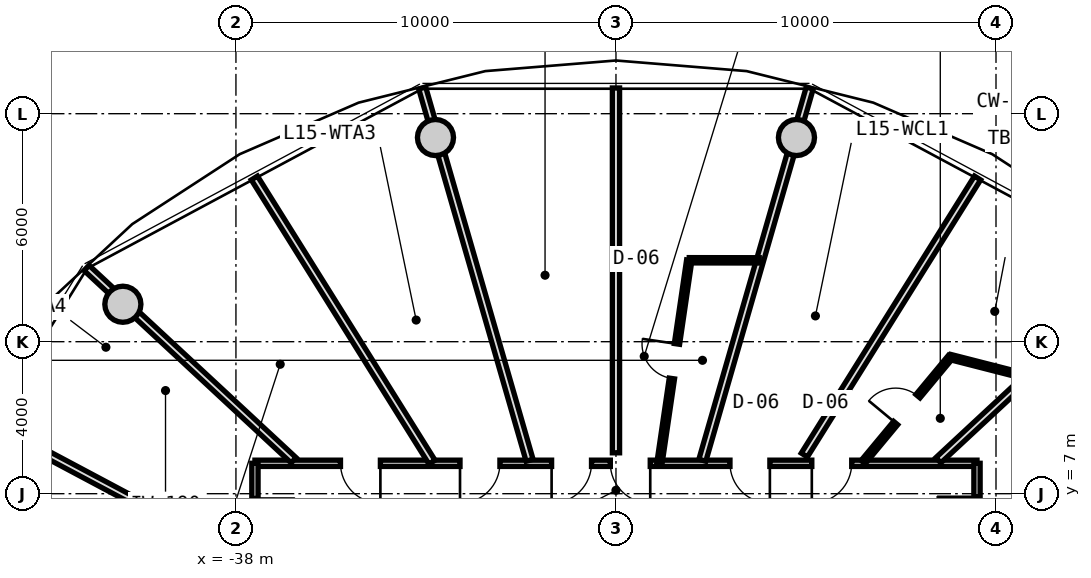
"""IFC4 building model, lengths in metres.
Left out: names, types, materials, properties, quantities, classifications, styles, units other than length and angle.
Written with IfcOpenShell. Run it as: python <this file> out.ifc"""

import sys

from ifc_helpers import new_model, si_unit, direction, frame, frame_2d, origin, origin_2d, place, context, subcontext, project, spatial, rectangle, circle, extrude, source, transform, mapped, element, fill, save


model = new_model("IFC4")
c1 = context("Model", 3, precision=1e-05, world=origin(), true_north=direction((0.0, 1.0)))
c2 = subcontext(c1, "Body", "Model", "MODEL_VIEW")
j1 = project(units=[si_unit("LENGTHUNIT", "METRE"), si_unit("PLANEANGLEUNIT", "RADIAN")], contexts=[c1])
p1 = place(None, origin())
s1 = spatial("IfcSite", under=j1, at=p1, CompositionType="ELEMENT")
p2 = place(p1, origin())
s2 = spatial("IfcBuilding", under=s1, at=p2, CompositionType="ELEMENT")
p3 = place(p2, frame((0.0, 0.0, 52.1)))
s3 = spatial("IfcBuildingStorey", under=s2, at=p3, CompositionType="ELEMENT", Elevation=52.1)
m1 = source(origin(), c2, "Body", "SweptSolid", [
    extrude(circle(Radius=0.475, at=origin_2d()), origin(), (0.0, 0.0, 1.0), 3.05),
])
for number, where, z_axis, x_axis in (
    (1, (-23.251, 16.373, 0.0), (0.0, 0.0, 1.0), (1.0, 0.0, 0.0)),
    (2, (-32.749, 16.373, 0.0), (0.0, 0.0, 1.0), (1.0, 0.0, 0.0)),
    (3, (-40.975, 11.985, 0.0), (0.0, 0.0, 1.0), (1.0, 0.0, 0.0)),
):
    element("IfcColumn", number, at=place(p3, frame(where, z_axis=z_axis, x_axis=x_axis)), inside=s3, PredefinedType="COLUMN", context=c2, shape_type="MappedRepresentation", body=[
        mapped(m1, transform((0.0, 0.0, 0.0), x_axis=(1.0, 0.0, 0.0), y_axis=(0.0, 1.0, 0.0), z_axis=(0.0, 0.0, 1.0), scale=1.0)),
    ])
m2 = source(origin(), c2, "Body", "SweptSolid", [
    extrude(rectangle(XDim=19.0, YDim=0.165, at=frame_2d((9.5, 0.0))), origin(), (0.0, 0.0, 1.0), 2.775),
])
p4 = place(p3, frame((-37.5, 7.8, 0.0), z_axis=(0.0, 0.0, 1.0), x_axis=(1.0, 0.0, 0.0)))
e4 = element("IfcWall", 4, at=p4, inside=s3, PredefinedType="PARTITIONING", context=c2, shape_type="MappedRepresentation", body=[
    mapped(m2, transform((0.0, 0.0, 0.0), x_axis=(1.0, 0.0, 0.0), y_axis=(0.0, 1.0, 0.0), z_axis=(0.0, 0.0, 1.0), scale=1.0)),
])
p5 = place(p4, frame((14.653, 0.0, 0.0)))
e5 = element("IfcOpeningElement", 5, at=p5, cuts=e4, PredefinedType="OPENING", context=c2, shape_type="SweptSolid", body=[
    extrude(rectangle(XDim=1.05, YDim=2.15, at=frame_2d((0.525, 1.075))), frame((0.0, 0.093, 0.0), z_axis=(0.0, -1.0, 0.0), x_axis=(1.0, 0.0, 0.0)), (0.0, 0.0, 1.0), 0.185),
])
p6 = place(p4, frame((12.5, 0.0, 0.0)))
e6 = element("IfcOpeningElement", 6, at=p6, cuts=e4, PredefinedType="OPENING", context=c2, shape_type="SweptSolid", body=[
    extrude(rectangle(XDim=1.05, YDim=2.15, at=frame_2d((0.525, 1.075))), frame((0.0, 0.093, 0.0), z_axis=(0.0, -1.0, 0.0), x_axis=(1.0, 0.0, 0.0)), (0.0, 0.0, 1.0), 0.185),
])
p7 = place(p4, frame((9.352, 0.0, 0.0)))
e7 = element("IfcOpeningElement", 7, at=p7, cuts=e4, PredefinedType="OPENING", context=c2, shape_type="SweptSolid", body=[
    extrude(rectangle(XDim=1.05, YDim=2.15, at=frame_2d((0.525, 1.075))), frame((0.0, 0.093, 0.0), z_axis=(0.0, -1.0, 0.0), x_axis=(1.0, 0.0, 0.0)), (0.0, 0.0, 1.0), 0.185),
])
p8 = place(p4, frame((7.806, 0.0, 0.0)))
e8 = element("IfcOpeningElement", 8, at=p8, cuts=e4, PredefinedType="OPENING", context=c2, shape_type="SweptSolid", body=[
    extrude(rectangle(XDim=1.05, YDim=2.15, at=frame_2d((0.525, 1.075))), frame((0.0, 0.093, 0.0), z_axis=(0.0, -1.0, 0.0), x_axis=(1.0, 0.0, 0.0)), (0.0, 0.0, 1.0), 0.185),
])
p9 = place(p4, frame((5.396, 0.0, 0.0)))
e9 = element("IfcOpeningElement", 9, at=p9, cuts=e4, PredefinedType="OPENING", context=c2, shape_type="SweptSolid", body=[
    extrude(rectangle(XDim=1.05, YDim=2.15, at=frame_2d((0.525, 1.075))), frame((0.0, 0.093, 0.0), z_axis=(0.0, -1.0, 0.0), x_axis=(1.0, 0.0, 0.0)), (0.0, 0.0, 1.0), 0.185),
])
p10 = place(p4, frame((2.251, 0.0, 0.0)))
e10 = element("IfcOpeningElement", 10, at=p10, cuts=e4, PredefinedType="OPENING", context=c2, shape_type="SweptSolid", body=[
    extrude(rectangle(XDim=1.05, YDim=2.15, at=frame_2d((0.525, 1.075))), frame((0.0, 0.093, 0.0), z_axis=(0.0, -1.0, 0.0), x_axis=(1.0, 0.0, 0.0)), (0.0, 0.0, 1.0), 0.185),
])
m3 = source(origin(), c2, "Body", "SweptSolid", [
    extrude(rectangle(XDim=15.6, YDim=0.165, at=frame_2d((7.8, 0.0))), origin(), (0.0, 0.0, 1.0), 2.775),
])
p11 = place(p3, frame((-37.5, -7.8, 0.0), z_axis=(0.0, 0.0, 1.0), x_axis=(0.0, 1.0, 0.0)))
e11 = element("IfcWall", 11, at=p11, inside=s3, PredefinedType="PARTITIONING", context=c2, shape_type="MappedRepresentation", body=[
    mapped(m3, transform((0.0, 0.0, 0.0), x_axis=(1.0, 0.0, 0.0), y_axis=(0.0, 1.0, 0.0), z_axis=(0.0, 0.0, 1.0), scale=1.0)),
])
p12 = place(p11, frame((13.623, 0.0, 0.0)))
e12 = element("IfcOpeningElement", 12, at=p12, cuts=e11, PredefinedType="OPENING", context=c2, shape_type="SweptSolid", body=[
    extrude(rectangle(XDim=1.05, YDim=2.15, at=frame_2d((0.525, 1.075))), frame((0.0, 0.093, 0.0), z_axis=(0.0, -1.0, 0.0), x_axis=(1.0, 0.0, 0.0)), (0.0, 0.0, 1.0), 0.185),
])
p13 = place(p11, frame((11.018, 0.0, 0.0)))
e13 = element("IfcOpeningElement", 13, at=p13, cuts=e11, PredefinedType="OPENING", context=c2, shape_type="SweptSolid", body=[
    extrude(rectangle(XDim=1.05, YDim=2.15, at=frame_2d((0.525, 1.075))), frame((0.0, 0.093, 0.0), z_axis=(0.0, -1.0, 0.0), x_axis=(1.0, 0.0, 0.0)), (0.0, 0.0, 1.0), 0.185),
])
p14 = place(p11, frame((8.467, 0.0, 0.0)))
e14 = element("IfcOpeningElement", 14, at=p14, cuts=e11, PredefinedType="OPENING", context=c2, shape_type="SweptSolid", body=[
    extrude(rectangle(XDim=1.05, YDim=2.15, at=frame_2d((0.525, 1.075))), frame((0.0, 0.093, 0.0), z_axis=(0.0, -1.0, 0.0), x_axis=(1.0, 0.0, 0.0)), (0.0, 0.0, 1.0), 0.185),
])
p15 = place(p11, frame((6.035, 0.0, 0.0)))
e15 = element("IfcOpeningElement", 15, at=p15, cuts=e11, PredefinedType="OPENING", context=c2, shape_type="SweptSolid", body=[
    extrude(rectangle(XDim=1.05, YDim=2.15, at=frame_2d((0.525, 1.075))), frame((0.0, 0.093, 0.0), z_axis=(0.0, -1.0, 0.0), x_axis=(1.0, 0.0, 0.0)), (0.0, 0.0, 1.0), 0.185),
])
p16 = place(p11, frame((3.489, 0.0, 0.0)))
e16 = element("IfcOpeningElement", 16, at=p16, cuts=e11, PredefinedType="OPENING", context=c2, shape_type="SweptSolid", body=[
    extrude(rectangle(XDim=1.05, YDim=2.15, at=frame_2d((0.525, 1.075))), frame((0.0, 0.093, 0.0), z_axis=(0.0, -1.0, 0.0), x_axis=(1.0, 0.0, 0.0)), (0.0, 0.0, 1.0), 0.185),
])
p17 = place(p11, frame((0.882, 0.0, 0.0)))
e17 = element("IfcOpeningElement", 17, at=p17, cuts=e11, PredefinedType="OPENING", context=c2, shape_type="SweptSolid", body=[
    extrude(rectangle(XDim=1.05, YDim=2.15, at=frame_2d((0.525, 1.075))), frame((0.0, 0.093, 0.0), z_axis=(0.0, -1.0, 0.0), x_axis=(1.0, 0.0, 0.0)), (0.0, 0.0, 1.0), 0.185),
])
p18 = place(p3, frame((-18.5, 7.8, 0.0), z_axis=(0.0, 0.0, 1.0), x_axis=(0.0, -1.0, 0.0)))
e18 = element("IfcWall", 18, at=p18, inside=s3, PredefinedType="PARTITIONING", context=c2, shape_type="MappedRepresentation", body=[
    mapped(m3, transform((0.0, 0.0, 0.0), x_axis=(1.0, 0.0, 0.0), y_axis=(0.0, 1.0, 0.0), z_axis=(0.0, 0.0, 1.0), scale=1.0)),
])
p19 = place(p18, frame((12.141, 0.0, 0.0)))
e19 = element("IfcOpeningElement", 19, at=p19, cuts=e18, PredefinedType="OPENING", context=c2, shape_type="SweptSolid", body=[
    extrude(rectangle(XDim=1.25, YDim=2.2, at=frame_2d((0.625, 1.1))), frame((0.0, 0.093, 0.0), z_axis=(0.0, -1.0, 0.0), x_axis=(1.0, 0.0, 0.0)), (0.0, 0.0, 1.0), 0.185),
])
p20 = place(p18, frame((7.175, 0.0, 0.0)))
e20 = element("IfcOpeningElement", 20, at=p20, cuts=e18, PredefinedType="OPENING", context=c2, shape_type="SweptSolid", body=[
    extrude(rectangle(XDim=1.25, YDim=2.2, at=frame_2d((0.625, 1.1))), frame((0.0, 0.093, 0.0), z_axis=(0.0, -1.0, 0.0), x_axis=(1.0, 0.0, 0.0)), (0.0, 0.0, 1.0), 0.185),
])
p21 = place(p18, frame((2.826, 0.0, 0.0)))
e21 = element("IfcOpeningElement", 21, at=p21, cuts=e18, PredefinedType="OPENING", context=c2, shape_type="SweptSolid", body=[
    extrude(rectangle(XDim=1.05, YDim=2.15, at=frame_2d((0.525, 1.075))), frame((0.0, 0.093, 0.0), z_axis=(0.0, -1.0, 0.0), x_axis=(1.0, 0.0, 0.0)), (0.0, 0.0, 1.0), 0.185),
])
p22 = place(p18, frame((0.881, 0.0, 0.0)))
e22 = element("IfcOpeningElement", 22, at=p22, cuts=e18, PredefinedType="OPENING", context=c2, shape_type="SweptSolid", body=[
    extrude(rectangle(XDim=1.05, YDim=2.15, at=frame_2d((0.525, 1.075))), frame((0.0, 0.093, 0.0), z_axis=(0.0, -1.0, 0.0), x_axis=(1.0, 0.0, 0.0)), (0.0, 0.0, 1.0), 0.185),
])
m4 = source(origin(), c2, "Body", "SweptSolid", [
    extrude(rectangle(XDim=7.435, YDim=0.19, at=frame_2d((3.717, 0.0))), origin(), (0.0, 0.0, 1.0), 2.225),
])
p23 = place(p3, frame((-36.483, 7.88, 0.0), z_axis=(0.0, 0.0, 1.0), x_axis=(-0.732651956848, 0.680603489652, 0.0)))
e23 = element("IfcWall", 23, at=p23, inside=s3, PredefinedType="PARTITIONING", context=c2, shape_type="MappedRepresentation", body=[
    mapped(m4, transform((0.0, 0.0, 0.0), x_axis=(1.0, 0.0, 0.0), y_axis=(0.0, 1.0, 0.0), z_axis=(0.0, 0.0, 1.0), scale=1.0)),
])
m5 = source(origin(), c2, "Body", "SweptSolid", [
    extrude(rectangle(XDim=7.873, YDim=0.19, at=frame_2d((3.937, 0.0))), origin(), (0.0, 0.0, 1.0), 2.775),
])
p24 = place(p3, frame((-37.53, 5.138, 0.0), z_axis=(0.0, 0.0, 1.0), x_axis=(-0.882666052726, 0.470000680175, 0.0)))
e24 = element("IfcWall", 24, at=p24, inside=s3, PredefinedType="PARTITIONING", context=c2, shape_type="MappedRepresentation", body=[
    mapped(m5, transform((0.0, 0.0, 0.0), x_axis=(1.0, 0.0, 0.0), y_axis=(0.0, 1.0, 0.0), z_axis=(0.0, 0.0, 1.0), scale=1.0)),
])
p25 = place(p3, frame((-19.517, 7.88, 0.0), z_axis=(0.0, 0.0, 1.0), x_axis=(0.732651956848, 0.680603489652, 0.0)))
e25 = element("IfcWall", 25, at=p25, inside=s3, PredefinedType="PARTITIONING", context=c2, shape_type="MappedRepresentation", body=[
    mapped(m4, transform((0.0, 0.0, 0.0), x_axis=(1.0, 0.0, 0.0), y_axis=(0.0, 1.0, 0.0), z_axis=(0.0, 0.0, 1.0), scale=1.0)),
])
m6 = source(origin(), c2, "Body", "SweptSolid", [
    extrude(rectangle(XDim=7.677, YDim=0.19, at=frame_2d((3.838, 0.0))), origin(), (0.0, 0.0, 1.0), 2.775),
])
p26 = place(p3, frame((-18.297, 5.231, 0.0), z_axis=(0.0, 0.0, 1.0), x_axis=(0.882725057546, 0.469889851753, 0.0)))
e26 = element("IfcWall", 26, at=p26, inside=s3, PredefinedType="PARTITIONING", context=c2, shape_type="MappedRepresentation", body=[
    mapped(m6, transform((0.0, 0.0, 0.0), x_axis=(1.0, 0.0, 0.0), y_axis=(0.0, 1.0, 0.0), z_axis=(0.0, 0.0, 1.0), scale=1.0)),
])
m7 = source(origin(), c2, "Body", "SweptSolid", [
    extrude(rectangle(XDim=10.196, YDim=0.19, at=frame_2d((5.098, 0.0))), origin(), (0.0, 0.0, 1.0), 2.225),
])
p27 = place(p3, frame((-25.727, 7.88, 0.0), z_axis=(0.0, 0.0, 1.0), x_axis=(0.277136420347, 0.960830580549, 0.0)))
e27 = element("IfcWall", 27, at=p27, inside=s3, PredefinedType="PARTITIONING", context=c2, shape_type="MappedRepresentation", body=[
    mapped(m7, transform((0.0, 0.0, 0.0), x_axis=(1.0, 0.0, 0.0), y_axis=(0.0, 1.0, 0.0), z_axis=(0.0, 0.0, 1.0), scale=1.0)),
])
m8 = source(origin(), c2, "Body", "SweptSolid", [
    extrude(rectangle(XDim=8.598, YDim=0.19, at=frame_2d((4.299, 0.0))), origin(), (0.0, 0.0, 1.0), 2.775),
])
p28 = place(p3, frame((-23.043, 8.017, 0.0), z_axis=(0.0, 0.0, 1.0), x_axis=(0.530039776395, 0.847972779893, 0.0)))
e28 = element("IfcWall", 28, at=p28, inside=s3, PredefinedType="PARTITIONING", context=c2, shape_type="MappedRepresentation", body=[
    mapped(m8, transform((0.0, 0.0, 0.0), x_axis=(1.0, 0.0, 0.0), y_axis=(0.0, 1.0, 0.0), z_axis=(0.0, 0.0, 1.0), scale=1.0)),
])
m9 = source(origin(), c2, "Body", "SweptSolid", [
    extrude(rectangle(XDim=3.594, YDim=0.14, at=frame_2d((1.797, 0.0))), origin(), (0.0, 0.0, 1.0), 2.775),
])
p29 = place(p3, frame((-21.496, 7.83, 0.0), z_axis=(0.0, 0.0, 1.0), x_axis=(0.639001147083, 0.769205781326, 0.0)))
e29 = element("IfcWall", 29, at=p29, inside=s3, PredefinedType="PARTITIONING", context=c2, shape_type="MappedRepresentation", body=[
    mapped(m9, transform((0.0, 0.0, 0.0), x_axis=(1.0, 0.0, 0.0), y_axis=(0.0, 1.0, 0.0), z_axis=(0.0, 0.0, 1.0), scale=1.0)),
])
p30 = place(p29, frame((1.337, 0.0, 0.0)))
e30 = element("IfcOpeningElement", 30, at=p30, cuts=e29, PredefinedType="OPENING", context=c2, shape_type="SweptSolid", body=[
    extrude(rectangle(XDim=0.92, YDim=2.1, at=frame_2d((0.46, 1.05))), frame((0.0, 0.08, 0.0), z_axis=(0.0, -1.0, 0.0), x_axis=(1.0, 0.0, 0.0)), (0.0, 0.0, 1.0), 0.16),
])
m10 = source(origin(), c2, "Body", "SweptSolid", [
    extrude(rectangle(XDim=2.062, YDim=0.14, at=frame_2d((1.031, 0.0))), origin(), (0.0, 0.0, 1.0), 2.415),
])
p31 = place(p3, frame((-19.199, 10.595, 0.0), z_axis=(0.0, 0.0, 1.0), x_axis=(0.968776253543, -0.247936626121, 0.0)))
e31 = element("IfcWall", 31, at=p31, inside=s3, PredefinedType="PARTITIONING", context=c2, shape_type="MappedRepresentation", body=[
    mapped(m10, transform((0.0, 0.0, 0.0), x_axis=(1.0, 0.0, 0.0), y_axis=(0.0, 1.0, 0.0), z_axis=(0.0, 0.0, 1.0), scale=1.0)),
])
p32 = place(p3, frame((-30.273, 7.88, 0.0), z_axis=(0.0, 0.0, 1.0), x_axis=(-0.277136420347, 0.960830580549, 0.0)))
e32 = element("IfcWall", 32, at=p32, inside=s3, PredefinedType="PARTITIONING", context=c2, shape_type="MappedRepresentation", body=[
    mapped(m7, transform((0.0, 0.0, 0.0), x_axis=(1.0, 0.0, 0.0), y_axis=(0.0, 1.0, 0.0), z_axis=(0.0, 0.0, 1.0), scale=1.0)),
])
m11 = source(origin(), c2, "Body", "SweptSolid", [
    extrude(rectangle(XDim=9.601, YDim=0.19, at=frame_2d((4.8, 0.0))), origin(), (0.0, 0.0, 1.0), 2.775),
])
p33 = place(p3, frame((-28.0, 8.076, 0.0), z_axis=(0.0, 0.0, 1.0), x_axis=(0.0, 1.0, 0.0)))
e33 = element("IfcWall", 33, at=p33, inside=s3, PredefinedType="PARTITIONING", context=c2, shape_type="MappedRepresentation", body=[
    mapped(m11, transform((0.0, 0.0, 0.0), x_axis=(1.0, 0.0, 0.0), y_axis=(0.0, 1.0, 0.0), z_axis=(0.0, 0.0, 1.0), scale=1.0)),
])
m12 = source(origin(), c2, "Body", "SweptSolid", [
    extrude(rectangle(XDim=5.37, YDim=0.14, at=frame_2d((2.685, 0.0))), origin(), (0.0, 0.0, 1.0), 2.775),
])
p34 = place(p3, frame((-26.851, 7.83, 0.0), z_axis=(0.0, 0.0, 1.0), x_axis=(0.145131397853, 0.989412389935, 0.0)))
e34 = element("IfcWall", 34, at=p34, inside=s3, PredefinedType="PARTITIONING", context=c2, shape_type="MappedRepresentation", body=[
    mapped(m12, transform((0.0, 0.0, 0.0), x_axis=(1.0, 0.0, 0.0), y_axis=(0.0, 1.0, 0.0), z_axis=(0.0, 0.0, 1.0), scale=1.0)),
])
p35 = place(p34, frame((2.225, 0.0, 0.0)))
e35 = element("IfcOpeningElement", 35, at=p35, cuts=e34, PredefinedType="OPENING", context=c2, shape_type="SweptSolid", body=[
    extrude(rectangle(XDim=0.92, YDim=2.1, at=frame_2d((0.46, 1.05))), frame((0.0, 0.08, 0.0), z_axis=(0.0, -1.0, 0.0), x_axis=(1.0, 0.0, 0.0)), (0.0, 0.0, 1.0), 0.16),
])
m13 = source(origin(), c2, "Body", "SweptSolid", [
    extrude(rectangle(XDim=1.843, YDim=0.14, at=frame_2d((0.921, 0.0))), origin(), (0.0, 0.0, 1.0), 2.775),
])
p36 = place(p3, frame((-26.072, 13.143, 0.0), z_axis=(0.0, 0.0, 1.0), x_axis=(0.999998937801, -0.001457531246, 0.0)))
e36 = element("IfcWall", 36, at=p36, inside=s3, PredefinedType="PARTITIONING", context=c2, shape_type="MappedRepresentation", body=[
    mapped(m13, transform((0.0, 0.0, 0.0), x_axis=(1.0, 0.0, 0.0), y_axis=(0.0, 1.0, 0.0), z_axis=(0.0, 0.0, 1.0), scale=1.0)),
])
m14 = source(origin(), c2, "Body", "SweptSolid", [
    extrude(rectangle(XDim=8.818, YDim=0.19, at=frame_2d((4.409, 0.0))), origin(), (0.0, 0.0, 1.0), 2.775),
])
p37 = place(p3, frame((-32.841, 7.83, 0.0), z_axis=(0.0, 0.0, 1.0), x_axis=(-0.529931746109, 0.848040296487, 0.0)))
e37 = element("IfcWall", 37, at=p37, inside=s3, PredefinedType="PARTITIONING", context=c2, shape_type="MappedRepresentation", body=[
    mapped(m14, transform((0.0, 0.0, 0.0), x_axis=(1.0, 0.0, 0.0), y_axis=(0.0, 1.0, 0.0), z_axis=(0.0, 0.0, 1.0), scale=1.0)),
])
m15 = source(origin(), c2, "Body", "SweptSolid", [
    extrude(rectangle(XDim=1.05, YDim=2.15, at=frame_2d((0.525, 1.075))), frame((0.0, 0.025, 0.0), z_axis=(0.0, -1.0, 0.0), x_axis=(1.0, 0.0, 0.0)), (0.0, 0.0, 1.0), 0.05),
])
p38 = place(p22, frame((1.05, 0.0, 0.0), z_axis=(0.0, 0.0, 1.0), x_axis=(-1.0, 0.0, 0.0)))
e38 = element("IfcDoor", 38, at=p38, inside=s3, OperationType="SINGLE_SWING_RIGHT", PredefinedType="DOOR", context=c2, shape_type="MappedRepresentation", body=[
    mapped(m15, transform((0.0, 0.0, 0.0), x_axis=(1.0, 0.0, 0.0), y_axis=(0.0, 1.0, 0.0), z_axis=(0.0, 0.0, 1.0), scale=1.0)),
])
fill(e22, e38)
p39 = place(p5, frame((1.05, 0.0, 0.0), z_axis=(0.0, 0.0, 1.0), x_axis=(-1.0, 0.0, 0.0)))
e39 = element("IfcDoor", 39, at=p39, inside=s3, OperationType="SINGLE_SWING_RIGHT", PredefinedType="DOOR", context=c2, shape_type="MappedRepresentation", body=[
    mapped(m15, transform((0.0, 0.0, 0.0), x_axis=(1.0, 0.0, 0.0), y_axis=(0.0, 1.0, 0.0), z_axis=(0.0, 0.0, 1.0), scale=1.0)),
])
fill(e5, e39)
m16 = source(origin(), c2, "Body", "SweptSolid", [
    extrude(rectangle(XDim=0.92, YDim=2.1, at=frame_2d((0.46, 1.05))), frame((0.0, 0.025, 0.0), z_axis=(0.0, -1.0, 0.0), x_axis=(1.0, 0.0, 0.0)), (0.0, 0.0, 1.0), 0.05),
])
p40 = place(p30, origin())
e40 = element("IfcDoor", 40, at=p40, inside=s3, OperationType="SINGLE_SWING_LEFT", PredefinedType="DOOR", context=c2, shape_type="MappedRepresentation", body=[
    mapped(m16, transform((0.0, 0.0, 0.0), x_axis=(1.0, 0.0, 0.0), y_axis=(0.0, 1.0, 0.0), z_axis=(0.0, 0.0, 1.0), scale=1.0)),
])
fill(e30, e40)
p41 = place(p6, frame((1.05, 0.0, 0.0), z_axis=(0.0, 0.0, 1.0), x_axis=(-1.0, 0.0, 0.0)))
e41 = element("IfcDoor", 41, at=p41, inside=s3, OperationType="SINGLE_SWING_LEFT", PredefinedType="DOOR", context=c2, shape_type="MappedRepresentation", body=[
    mapped(m15, transform((0.0, 0.0, 0.0), x_axis=(1.0, 0.0, 0.0), y_axis=(0.0, 1.0, 0.0), z_axis=(0.0, 0.0, 1.0), scale=1.0)),
])
fill(e6, e41)
p42 = place(p7, frame((1.05, 0.0, 0.0), z_axis=(0.0, 0.0, 1.0), x_axis=(-1.0, 0.0, 0.0)))
e42 = element("IfcDoor", 42, at=p42, inside=s3, OperationType="SINGLE_SWING_LEFT", PredefinedType="DOOR", context=c2, shape_type="MappedRepresentation", body=[
    mapped(m15, transform((0.0, 0.0, 0.0), x_axis=(1.0, 0.0, 0.0), y_axis=(0.0, 1.0, 0.0), z_axis=(0.0, 0.0, 1.0), scale=1.0)),
])
fill(e7, e42)
p43 = place(p35, origin())
e43 = element("IfcDoor", 43, at=p43, inside=s3, OperationType="SINGLE_SWING_RIGHT", PredefinedType="DOOR", context=c2, shape_type="MappedRepresentation", body=[
    mapped(m16, transform((0.0, 0.0, 0.0), x_axis=(1.0, 0.0, 0.0), y_axis=(0.0, 1.0, 0.0), z_axis=(0.0, 0.0, 1.0), scale=1.0)),
])
fill(e35, e43)
p44 = place(p8, frame((1.05, 0.0, 0.0), z_axis=(0.0, 0.0, 1.0), x_axis=(-1.0, 0.0, 0.0)))
e44 = element("IfcDoor", 44, at=p44, inside=s3, OperationType="SINGLE_SWING_RIGHT", PredefinedType="DOOR", context=c2, shape_type="MappedRepresentation", body=[
    mapped(m15, transform((0.0, 0.0, 0.0), x_axis=(1.0, 0.0, 0.0), y_axis=(0.0, 1.0, 0.0), z_axis=(0.0, 0.0, 1.0), scale=1.0)),
])
fill(e8, e44)
p45 = place(p9, frame((1.05, 0.0, 0.0), z_axis=(0.0, 0.0, 1.0), x_axis=(-1.0, 0.0, 0.0)))
e45 = element("IfcDoor", 45, at=p45, inside=s3, OperationType="SINGLE_SWING_RIGHT", PredefinedType="DOOR", context=c2, shape_type="MappedRepresentation", body=[
    mapped(m15, transform((0.0, 0.0, 0.0), x_axis=(1.0, 0.0, 0.0), y_axis=(0.0, 1.0, 0.0), z_axis=(0.0, 0.0, 1.0), scale=1.0)),
])
fill(e9, e45)
p46 = place(p10, frame((1.05, 0.0, 0.0), z_axis=(0.0, 0.0, 1.0), x_axis=(-1.0, 0.0, 0.0)))
e46 = element("IfcDoor", 46, at=p46, inside=s3, OperationType="SINGLE_SWING_LEFT", PredefinedType="DOOR", context=c2, shape_type="MappedRepresentation", body=[
    mapped(m15, transform((0.0, 0.0, 0.0), x_axis=(1.0, 0.0, 0.0), y_axis=(0.0, 1.0, 0.0), z_axis=(0.0, 0.0, 1.0), scale=1.0)),
])
fill(e10, e46)
save(model, sys.argv[1])
